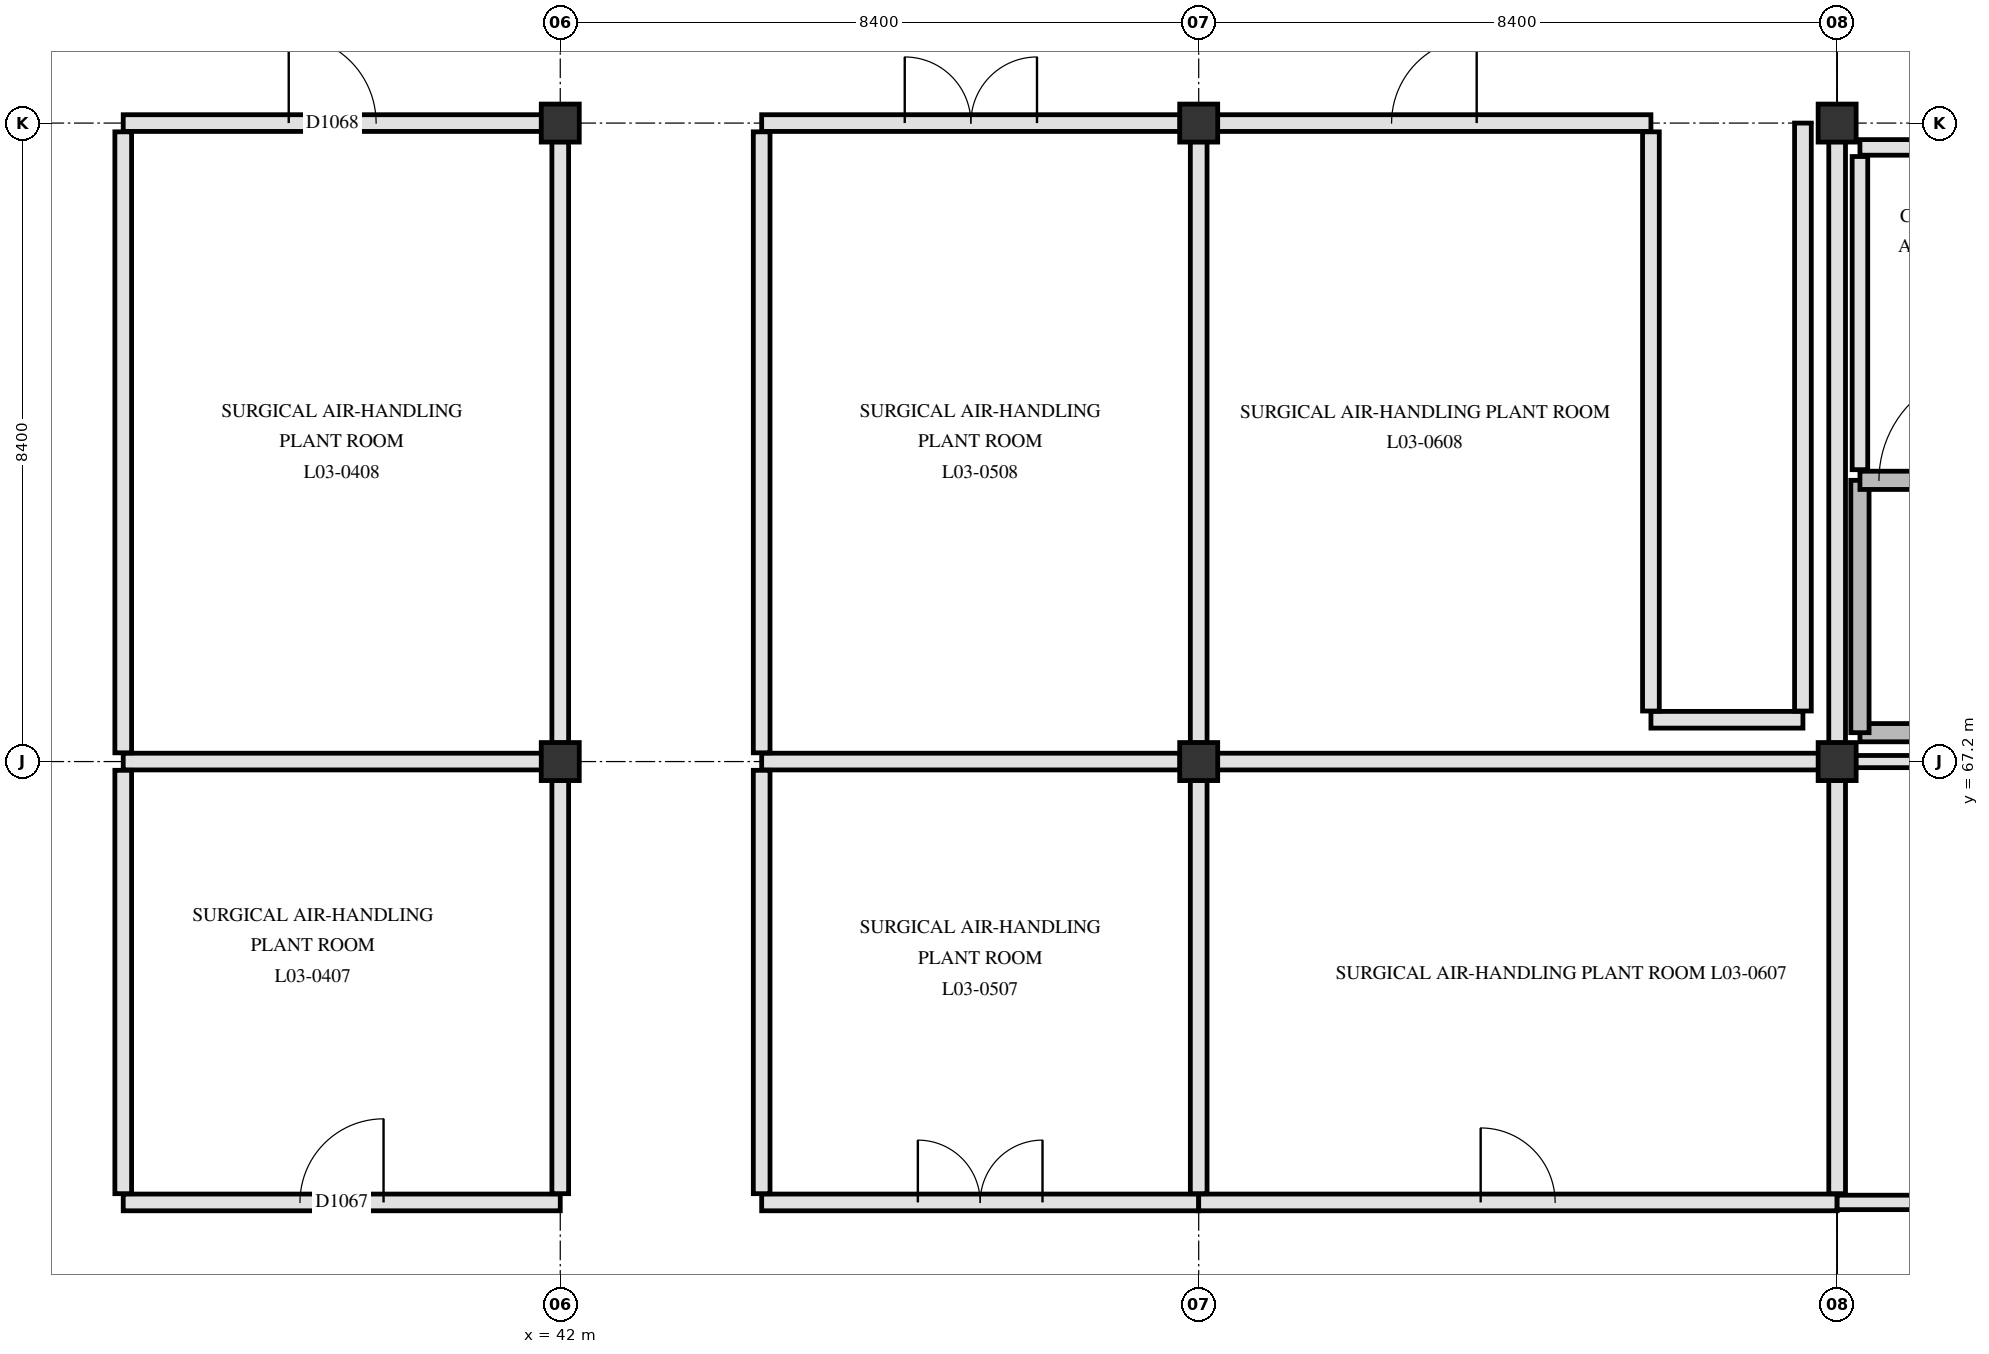
"""IFC4 building model, lengths in metres.
Left out: names, types, materials, properties, quantities, classifications, styles, units other than length and angle.
Written with IfcOpenShell. Run it as: python <this file> out.ifc"""

import sys

from ifc_helpers import new_model, si_unit, direction, frame, frame_2d, origin, origin_2d, place, context, subcontext, project, spatial, rectangle, extrude, element, fill, save


model = new_model("IFC4")
c1 = context("Model", 3, precision=1e-05, world=origin(), true_north=direction((0.0, 1.0)))
c2 = subcontext(c1, "Body", "Model", "MODEL_VIEW")
j1 = project(units=[si_unit("LENGTHUNIT", "METRE"), si_unit("PLANEANGLEUNIT", "RADIAN")], contexts=[c1])
p1 = place(None, origin())
s1 = spatial("IfcSite", under=j1, at=p1, CompositionType="ELEMENT")
p2 = place(p1, origin())
s2 = spatial("IfcBuilding", under=s1, at=p2, CompositionType="ELEMENT")
p3 = place(p2, frame((0.0, 0.0, 14.4)))
s3 = spatial("IfcBuildingStorey", under=s2, at=p3, CompositionType="ELEMENT", Elevation=14.4)
for number, where, z_axis, x_axis in (
    (1, (42.0, 67.2, 0.0), (0.0, 0.0, 1.0), (1.0, 0.0, 0.0)),
    (2, (42.0, 75.6, 0.0), (0.0, 0.0, 1.0), (1.0, 0.0, 0.0)),
    (3, (50.4, 67.2, 0.0), (0.0, 0.0, 1.0), (1.0, 0.0, 0.0)),
    (4, (50.4, 75.6, 0.0), (0.0, 0.0, 1.0), (1.0, 0.0, 0.0)),
    (5, (58.8, 67.2, 0.0), (0.0, 0.0, 1.0), (1.0, 0.0, 0.0)),
    (6, (58.8, 75.6, 0.0), (0.0, 0.0, 1.0), (1.0, 0.0, 0.0)),
):
    element("IfcColumn", number, at=place(p3, frame(where, z_axis=z_axis, x_axis=x_axis)), inside=s3, PredefinedType="COLUMN", context=c2, shape_type="SweptSolid", body=[
        extrude(rectangle(XDim=0.5, YDim=0.5, at=origin_2d()), origin(), (0.0, 0.0, 1.0), 4.2),
    ])
p4 = place(p3, frame((59.1, 67.58, 0.0), z_axis=(0.0, 0.0, 1.0), x_axis=(1.0, 0.0, 0.0)))
e7 = element("IfcWall", 7, at=p4, inside=s3, PredefinedType="SHEAR", context=c2, shape_type="SweptSolid", body=[
    extrude(rectangle(XDim=7.82, YDim=0.24, at=frame_2d((3.91, 0.0))), origin(), (0.0, 0.0, 1.0), 3.9),
])
p5 = place(p3, frame((59.1, 67.58, 0.0), z_axis=(0.0, 0.0, 1.0), x_axis=(0.0, 1.0, 0.0)))
e8 = element("IfcWall", 8, at=p5, inside=s3, PredefinedType="SHEAR", context=c2, shape_type="SweptSolid", body=[
    extrude(rectangle(XDim=3.32, YDim=0.24, at=frame_2d((1.66, 0.0))), origin(), (0.0, 0.0, 1.0), 3.9),
])
p6 = place(p3, frame((59.1, 70.9, 0.0), z_axis=(0.0, 0.0, 1.0), x_axis=(1.0, 0.0, 0.0)))
e9 = element("IfcWall", 9, at=p6, inside=s3, PredefinedType="SHEAR", context=c2, shape_type="SweptSolid", body=[
    extrude(rectangle(XDim=7.82, YDim=0.24, at=frame_2d((3.91, 0.0))), origin(), (0.0, 0.0, 1.0), 3.9),
])
p7 = place(p6, frame((0.25, 0.0, 0.0)))
e10 = element("IfcOpeningElement", 10, at=p7, cuts=e9, PredefinedType="OPENING", context=c2, shape_type="SweptSolid", body=[
    extrude(rectangle(XDim=1.45, YDim=2.2, at=frame_2d((0.725, 1.1))), frame((0.0, 0.13, 0.0), z_axis=(0.0, -1.0, 0.0), x_axis=(1.0, 0.0, 0.0)), (0.0, 0.0, 1.0), 0.26),
])
p8 = place(p3, frame((59.1, 71.04, 0.0), z_axis=(0.0, 0.0, 1.0), x_axis=(0.0, 1.0, 0.0)))
e11 = element("IfcWall", 11, at=p8, inside=s3, PredefinedType="PARTITIONING", context=c2, shape_type="SweptSolid", body=[
    extrude(rectangle(XDim=4.12, YDim=0.205, at=frame_2d((2.06, 0.0))), origin(), (0.0, 0.0, 1.0), 3.33),
])
p9 = place(p3, frame((59.1, 75.28, 0.0), z_axis=(0.0, 0.0, 1.0), x_axis=(1.0, 0.0, 0.0)))
e12 = element("IfcWall", 12, at=p9, inside=s3, PredefinedType="PARTITIONING", context=c2, shape_type="SweptSolid", body=[
    extrude(rectangle(XDim=4.18, YDim=0.205, at=frame_2d((2.09, 0.0))), origin(), (0.0, 0.0, 1.0), 3.28),
])
p10 = place(p9, frame((1.29, 0.0, 0.0)))
e13 = element("IfcOpeningElement", 13, at=p10, cuts=e12, PredefinedType="OPENING", context=c2, shape_type="SweptSolid", body=[
    extrude(rectangle(XDim=1.6, YDim=2.25, at=frame_2d((0.8, 1.125))), frame((0.0, 0.113, 0.0), z_axis=(0.0, -1.0, 0.0), x_axis=(1.0, 0.0, 0.0)), (0.0, 0.0, 1.0), 0.225),
])
p11 = place(p3, frame((36.25, 61.4, 0.0), z_axis=(0.0, 0.0, 1.0), x_axis=(1.0, 0.0, 0.0)))
e14 = element("IfcWall", 14, at=p11, inside=s3, PredefinedType="PARTITIONING", context=c2, shape_type="SweptSolid", body=[
    extrude(rectangle(XDim=5.75, YDim=0.22, at=frame_2d((2.875, 0.0))), origin(), (0.0, 0.0, 1.0), 3.33),
])
p12 = place(p11, frame((2.325, 0.0, 0.0)))
e15 = element("IfcOpeningElement", 15, at=p12, cuts=e14, PredefinedType="OPENING", context=c2, shape_type="SweptSolid", body=[
    extrude(rectangle(XDim=1.1, YDim=2.15, at=frame_2d((0.55, 1.075))), frame((0.0, 0.12, 0.0), z_axis=(0.0, -1.0, 0.0), x_axis=(1.0, 0.0, 0.0)), (0.0, 0.0, 1.0), 0.24),
])
p13 = place(p3, frame((44.65, 61.4, 0.0), z_axis=(0.0, 0.0, 1.0), x_axis=(1.0, 0.0, 0.0)))
e16 = element("IfcWall", 16, at=p13, inside=s3, PredefinedType="PARTITIONING", context=c2, shape_type="SweptSolid", body=[
    extrude(rectangle(XDim=5.75, YDim=0.22, at=frame_2d((2.875, 0.0))), origin(), (0.0, 0.0, 1.0), 2.88),
])
p14 = place(p13, frame((2.055, 0.0, 0.0)))
e17 = element("IfcOpeningElement", 17, at=p14, cuts=e16, PredefinedType="OPENING", context=c2, shape_type="SweptSolid", body=[
    extrude(rectangle(XDim=1.64, YDim=2.28, at=frame_2d((0.82, 1.14))), frame((0.0, 0.12, 0.0), z_axis=(0.0, -1.0, 0.0), x_axis=(1.0, 0.0, 0.0)), (0.0, 0.0, 1.0), 0.24),
])
p15 = place(p3, frame((50.4, 61.4, 0.0), z_axis=(0.0, 0.0, 1.0), x_axis=(1.0, 0.0, 0.0)))
e18 = element("IfcWall", 18, at=p15, inside=s3, PredefinedType="PARTITIONING", context=c2, shape_type="SweptSolid", body=[
    extrude(rectangle(XDim=8.4, YDim=0.22, at=frame_2d((4.2, 0.0))), origin(), (0.0, 0.0, 1.0), 2.88),
])
p16 = place(p15, frame((3.71, 0.0, 0.0)))
e19 = element("IfcOpeningElement", 19, at=p16, cuts=e18, PredefinedType="OPENING", context=c2, shape_type="SweptSolid", body=[
    extrude(rectangle(XDim=0.98, YDim=2.12, at=frame_2d((0.49, 1.06))), frame((0.0, 0.12, 0.0), z_axis=(0.0, -1.0, 0.0), x_axis=(1.0, 0.0, 0.0)), (0.0, 0.0, 1.0), 0.24),
])
p17 = place(p3, frame((58.8, 61.4, 0.0), z_axis=(0.0, 0.0, 1.0), x_axis=(1.0, 0.0, 0.0)))
e20 = element("IfcWall", 20, at=p17, inside=s3, PredefinedType="PARTITIONING", context=c2, shape_type="SweptSolid", body=[
    extrude(rectangle(XDim=8.4, YDim=0.19, at=frame_2d((4.2, 0.0))), origin(), (0.0, 0.0, 1.0), 3.33),
])
p18 = place(p17, frame((3.475, 0.0, 0.0)))
e21 = element("IfcOpeningElement", 21, at=p18, cuts=e20, PredefinedType="OPENING", context=c2, shape_type="SweptSolid", body=[
    extrude(rectangle(XDim=1.45, YDim=2.2, at=frame_2d((0.725, 1.1))), frame((0.0, 0.105, 0.0), z_axis=(0.0, -1.0, 0.0), x_axis=(1.0, 0.0, 0.0)), (0.0, 0.0, 1.0), 0.21),
])
p19 = place(p3, frame((36.25, 67.2, 0.0), z_axis=(0.0, 0.0, 1.0), x_axis=(1.0, 0.0, 0.0)))
e22 = element("IfcWall", 22, at=p19, inside=s3, PredefinedType="PARTITIONING", context=c2, shape_type="SweptSolid", body=[
    extrude(rectangle(XDim=5.505, YDim=0.22, at=frame_2d((2.752, 0.0))), origin(), (0.0, 0.0, 1.0), 3.28),
])
p20 = place(p3, frame((44.65, 67.2, 0.0), z_axis=(0.0, 0.0, 1.0), x_axis=(1.0, 0.0, 0.0)))
e23 = element("IfcWall", 23, at=p20, inside=s3, PredefinedType="PARTITIONING", context=c2, shape_type="SweptSolid", body=[
    extrude(rectangle(XDim=5.505, YDim=0.22, at=frame_2d((2.752, 0.0))), origin(), (0.0, 0.0, 1.0), 3.28),
])
p21 = place(p3, frame((50.645, 67.2, 0.0), z_axis=(0.0, 0.0, 1.0), x_axis=(1.0, 0.0, 0.0)))
e24 = element("IfcWall", 24, at=p21, inside=s3, PredefinedType="PARTITIONING", context=c2, shape_type="SweptSolid", body=[
    extrude(rectangle(XDim=7.91, YDim=0.22, at=frame_2d((3.955, 0.0))), origin(), (0.0, 0.0, 1.0), 3.28),
])
p22 = place(p3, frame((59.045, 67.2, 0.0), z_axis=(0.0, 0.0, 1.0), x_axis=(1.0, 0.0, 0.0)))
e25 = element("IfcWall", 25, at=p22, inside=s3, PredefinedType="PARTITIONING", context=c2, shape_type="SweptSolid", body=[
    extrude(rectangle(XDim=7.91, YDim=0.16, at=frame_2d((3.955, 0.0))), origin(), (0.0, 0.0, 1.0), 3.28),
])
p23 = place(p3, frame((56.35, 67.75, 0.0), z_axis=(0.0, 0.0, 1.0), x_axis=(1.0, 0.0, 0.0)))
e26 = element("IfcWall", 26, at=p23, inside=s3, PredefinedType="PARTITIONING", context=c2, shape_type="SweptSolid", body=[
    extrude(rectangle(XDim=2.0, YDim=0.22, at=frame_2d((1.0, 0.0))), origin(), (0.0, 0.0, 1.0), 3.89),
])
p24 = place(p3, frame((36.25, 75.6, 0.0), z_axis=(0.0, 0.0, 1.0), x_axis=(1.0, 0.0, 0.0)))
e27 = element("IfcWall", 27, at=p24, inside=s3, PredefinedType="PARTITIONING", context=c2, shape_type="SweptSolid", body=[
    extrude(rectangle(XDim=5.505, YDim=0.22, at=frame_2d((2.752, 0.0))), origin(), (0.0, 0.0, 1.0), 3.28),
])
p25 = place(p24, frame((2.177, 0.0, 0.0)))
e28 = element("IfcOpeningElement", 28, at=p25, cuts=e27, PredefinedType="OPENING", context=c2, shape_type="SweptSolid", body=[
    extrude(rectangle(XDim=1.15, YDim=2.15, at=frame_2d((0.575, 1.075))), frame((0.0, 0.12, 0.0), z_axis=(0.0, -1.0, 0.0), x_axis=(1.0, 0.0, 0.0)), (0.0, 0.0, 1.0), 0.24),
])
p26 = place(p3, frame((44.65, 75.6, 0.0), z_axis=(0.0, 0.0, 1.0), x_axis=(1.0, 0.0, 0.0)))
e29 = element("IfcWall", 29, at=p26, inside=s3, PredefinedType="PARTITIONING", context=c2, shape_type="SweptSolid", body=[
    extrude(rectangle(XDim=5.505, YDim=0.22, at=frame_2d((2.752, 0.0))), origin(), (0.0, 0.0, 1.0), 3.28),
])
p27 = place(p26, frame((1.883, 0.0, 0.0)))
e30 = element("IfcOpeningElement", 30, at=p27, cuts=e29, PredefinedType="OPENING", context=c2, shape_type="SweptSolid", body=[
    extrude(rectangle(XDim=1.74, YDim=2.24, at=frame_2d((0.87, 1.12))), frame((0.0, 0.12, 0.0), z_axis=(0.0, -1.0, 0.0), x_axis=(1.0, 0.0, 0.0)), (0.0, 0.0, 1.0), 0.24),
])
p28 = place(p3, frame((50.645, 75.6, 0.0), z_axis=(0.0, 0.0, 1.0), x_axis=(1.0, 0.0, 0.0)))
e31 = element("IfcWall", 31, at=p28, inside=s3, PredefinedType="PARTITIONING", context=c2, shape_type="SweptSolid", body=[
    extrude(rectangle(XDim=5.705, YDim=0.22, at=frame_2d((2.853, 0.0))), origin(), (0.0, 0.0, 1.0), 3.28),
])
p29 = place(p28, frame((2.292, 0.0, 0.0)))
e32 = element("IfcOpeningElement", 32, at=p29, cuts=e31, PredefinedType="OPENING", context=c2, shape_type="SweptSolid", body=[
    extrude(rectangle(XDim=1.12, YDim=2.18, at=frame_2d((0.56, 1.09))), frame((0.0, 0.12, 0.0), z_axis=(0.0, -1.0, 0.0), x_axis=(1.0, 0.0, 0.0)), (0.0, 0.0, 1.0), 0.24),
])
p30 = place(p3, frame((36.25, 61.515, 0.0), z_axis=(0.0, 0.0, 1.0), x_axis=(0.0, 1.0, 0.0)))
e33 = element("IfcWall", 33, at=p30, inside=s3, PredefinedType="PARTITIONING", context=c2, shape_type="SweptSolid", body=[
    extrude(rectangle(XDim=5.57, YDim=0.22, at=frame_2d((2.785, 0.0))), origin(), (0.0, 0.0, 1.0), 3.28),
])
p31 = place(p3, frame((36.25, 67.315, 0.0), z_axis=(0.0, 0.0, 1.0), x_axis=(0.0, 1.0, 0.0)))
e34 = element("IfcWall", 34, at=p31, inside=s3, PredefinedType="PARTITIONING", context=c2, shape_type="SweptSolid", body=[
    extrude(rectangle(XDim=8.17, YDim=0.22, at=frame_2d((4.085, 0.0))), origin(), (0.0, 0.0, 1.0), 3.28),
])
p32 = place(p3, frame((42.0, 61.515, 0.0), z_axis=(0.0, 0.0, 1.0), x_axis=(0.0, 1.0, 0.0)))
e35 = element("IfcWall", 35, at=p32, inside=s3, PredefinedType="PARTITIONING", context=c2, shape_type="SweptSolid", body=[
    extrude(rectangle(XDim=5.44, YDim=0.22, at=frame_2d((2.72, 0.0))), origin(), (0.0, 0.0, 1.0), 3.33),
])
p33 = place(p3, frame((42.0, 67.445, 0.0), z_axis=(0.0, 0.0, 1.0), x_axis=(0.0, 1.0, 0.0)))
e36 = element("IfcWall", 36, at=p33, inside=s3, PredefinedType="PARTITIONING", context=c2, shape_type="SweptSolid", body=[
    extrude(rectangle(XDim=7.91, YDim=0.22, at=frame_2d((3.955, 0.0))), origin(), (0.0, 0.0, 1.0), 3.33),
])
p34 = place(p3, frame((44.65, 61.515, 0.0), z_axis=(0.0, 0.0, 1.0), x_axis=(0.0, 1.0, 0.0)))
e37 = element("IfcWall", 37, at=p34, inside=s3, PredefinedType="PARTITIONING", context=c2, shape_type="SweptSolid", body=[
    extrude(rectangle(XDim=5.57, YDim=0.22, at=frame_2d((2.785, 0.0))), origin(), (0.0, 0.0, 1.0), 3.28),
])
p35 = place(p3, frame((44.65, 67.315, 0.0), z_axis=(0.0, 0.0, 1.0), x_axis=(0.0, 1.0, 0.0)))
e38 = element("IfcWall", 38, at=p35, inside=s3, PredefinedType="PARTITIONING", context=c2, shape_type="SweptSolid", body=[
    extrude(rectangle(XDim=8.17, YDim=0.22, at=frame_2d((4.085, 0.0))), origin(), (0.0, 0.0, 1.0), 3.28),
])
p36 = place(p3, frame((50.4, 61.515, 0.0), z_axis=(0.0, 0.0, 1.0), x_axis=(0.0, 1.0, 0.0)))
e39 = element("IfcWall", 39, at=p36, inside=s3, PredefinedType="PARTITIONING", context=c2, shape_type="SweptSolid", body=[
    extrude(rectangle(XDim=5.44, YDim=0.22, at=frame_2d((2.72, 0.0))), origin(), (0.0, 0.0, 1.0), 2.88),
])
p37 = place(p3, frame((50.4, 67.445, 0.0), z_axis=(0.0, 0.0, 1.0), x_axis=(0.0, 1.0, 0.0)))
e40 = element("IfcWall", 40, at=p37, inside=s3, PredefinedType="PARTITIONING", context=c2, shape_type="SweptSolid", body=[
    extrude(rectangle(XDim=7.91, YDim=0.22, at=frame_2d((3.955, 0.0))), origin(), (0.0, 0.0, 1.0), 2.88),
])
p38 = place(p3, frame((56.35, 67.865, 0.0), z_axis=(0.0, 0.0, 1.0), x_axis=(0.0, 1.0, 0.0)))
e41 = element("IfcWall", 41, at=p38, inside=s3, PredefinedType="PARTITIONING", context=c2, shape_type="SweptSolid", body=[
    extrude(rectangle(XDim=7.62, YDim=0.22, at=frame_2d((3.81, 0.0))), origin(), (0.0, 0.0, 1.0), 3.28),
])
p39 = place(p3, frame((58.35, 67.865, 0.0), z_axis=(0.0, 0.0, 1.0), x_axis=(0.0, 1.0, 0.0)))
e42 = element("IfcWall", 42, at=p39, inside=s3, PredefinedType="PARTITIONING", context=c2, shape_type="SweptSolid", body=[
    extrude(rectangle(XDim=7.735, YDim=0.22, at=frame_2d((3.868, 0.0))), origin(), (0.0, 0.0, 1.0), 3.28),
])
p40 = place(p3, frame((58.8, 61.515, 0.0), z_axis=(0.0, 0.0, 1.0), x_axis=(0.0, 1.0, 0.0)))
e43 = element("IfcWall", 43, at=p40, inside=s3, PredefinedType="PARTITIONING", context=c2, shape_type="SweptSolid", body=[
    extrude(rectangle(XDim=5.44, YDim=0.22, at=frame_2d((2.72, 0.0))), origin(), (0.0, 0.0, 1.0), 3.33),
])
p41 = place(p3, frame((58.8, 67.445, 0.0), z_axis=(0.0, 0.0, 1.0), x_axis=(0.0, 1.0, 0.0)))
e44 = element("IfcWall", 44, at=p41, inside=s3, PredefinedType="PARTITIONING", context=c2, shape_type="SweptSolid", body=[
    extrude(rectangle(XDim=7.91, YDim=0.22, at=frame_2d((3.955, 0.0))), origin(), (0.0, 0.0, 1.0), 3.33),
])
p42 = place(p7, origin())
e45 = element("IfcDoor", 45, at=p42, inside=s3, OperationType="SINGLE_SWING_RIGHT", PredefinedType="DOOR", context=c2, shape_type="SweptSolid", body=[
    extrude(rectangle(XDim=1.45, YDim=2.2, at=frame_2d((0.725, 1.1))), frame((0.0, 0.025, 0.0), z_axis=(0.0, -1.0, 0.0), x_axis=(1.0, 0.0, 0.0)), (0.0, 0.0, 1.0), 0.05),
])
fill(e10, e45)
p43 = place(p12, origin())
e46 = element("IfcDoor", 46, at=p43, inside=s3, OperationType="SINGLE_SWING_RIGHT", PredefinedType="DOOR", context=c2, shape_type="SweptSolid", body=[
    extrude(rectangle(XDim=1.1, YDim=2.15, at=frame_2d((0.55, 1.075))), frame((0.0, 0.025, 0.0), z_axis=(0.0, -1.0, 0.0), x_axis=(1.0, 0.0, 0.0)), (0.0, 0.0, 1.0), 0.05),
])
fill(e15, e46)
p44 = place(p25, origin())
e47 = element("IfcDoor", 47, at=p44, inside=s3, OperationType="SINGLE_SWING_LEFT", PredefinedType="DOOR", context=c2, shape_type="SweptSolid", body=[
    extrude(rectangle(XDim=1.15, YDim=2.15, at=frame_2d((0.575, 1.075))), frame((0.0, 0.025, 0.0), z_axis=(0.0, -1.0, 0.0), x_axis=(1.0, 0.0, 0.0)), (0.0, 0.0, 1.0), 0.05),
])
fill(e28, e47)
p45 = place(p14, origin())
e48 = element("IfcDoor", 48, at=p45, inside=s3, OperationType="DOUBLE_SWING_LEFT", PredefinedType="DOOR", context=c2, shape_type="SweptSolid", body=[
    extrude(rectangle(XDim=1.64, YDim=2.28, at=frame_2d((0.82, 1.14))), frame((0.0, 0.025, 0.0), z_axis=(0.0, -1.0, 0.0), x_axis=(1.0, 0.0, 0.0)), (0.0, 0.0, 1.0), 0.05),
])
fill(e17, e48)
p46 = place(p27, origin())
e49 = element("IfcDoor", 49, at=p46, inside=s3, OperationType="DOUBLE_SWING_RIGHT", PredefinedType="DOOR", context=c2, shape_type="SweptSolid", body=[
    extrude(rectangle(XDim=1.74, YDim=2.24, at=frame_2d((0.87, 1.12))), frame((0.0, 0.025, 0.0), z_axis=(0.0, -1.0, 0.0), x_axis=(1.0, 0.0, 0.0)), (0.0, 0.0, 1.0), 0.05),
])
fill(e30, e49)
p47 = place(p16, origin())
e50 = element("IfcDoor", 50, at=p47, inside=s3, OperationType="SINGLE_SWING_LEFT", PredefinedType="DOOR", context=c2, shape_type="SweptSolid", body=[
    extrude(rectangle(XDim=0.98, YDim=2.12, at=frame_2d((0.49, 1.06))), frame((0.0, 0.025, 0.0), z_axis=(0.0, -1.0, 0.0), x_axis=(1.0, 0.0, 0.0)), (0.0, 0.0, 1.0), 0.05),
])
fill(e19, e50)
p48 = place(p29, origin())
e51 = element("IfcDoor", 51, at=p48, inside=s3, OperationType="SINGLE_SWING_RIGHT", PredefinedType="DOOR", context=c2, shape_type="SweptSolid", body=[
    extrude(rectangle(XDim=1.12, YDim=2.18, at=frame_2d((0.56, 1.09))), frame((0.0, 0.025, 0.0), z_axis=(0.0, -1.0, 0.0), x_axis=(1.0, 0.0, 0.0)), (0.0, 0.0, 1.0), 0.05),
])
fill(e32, e51)
save(model, sys.argv[1])
